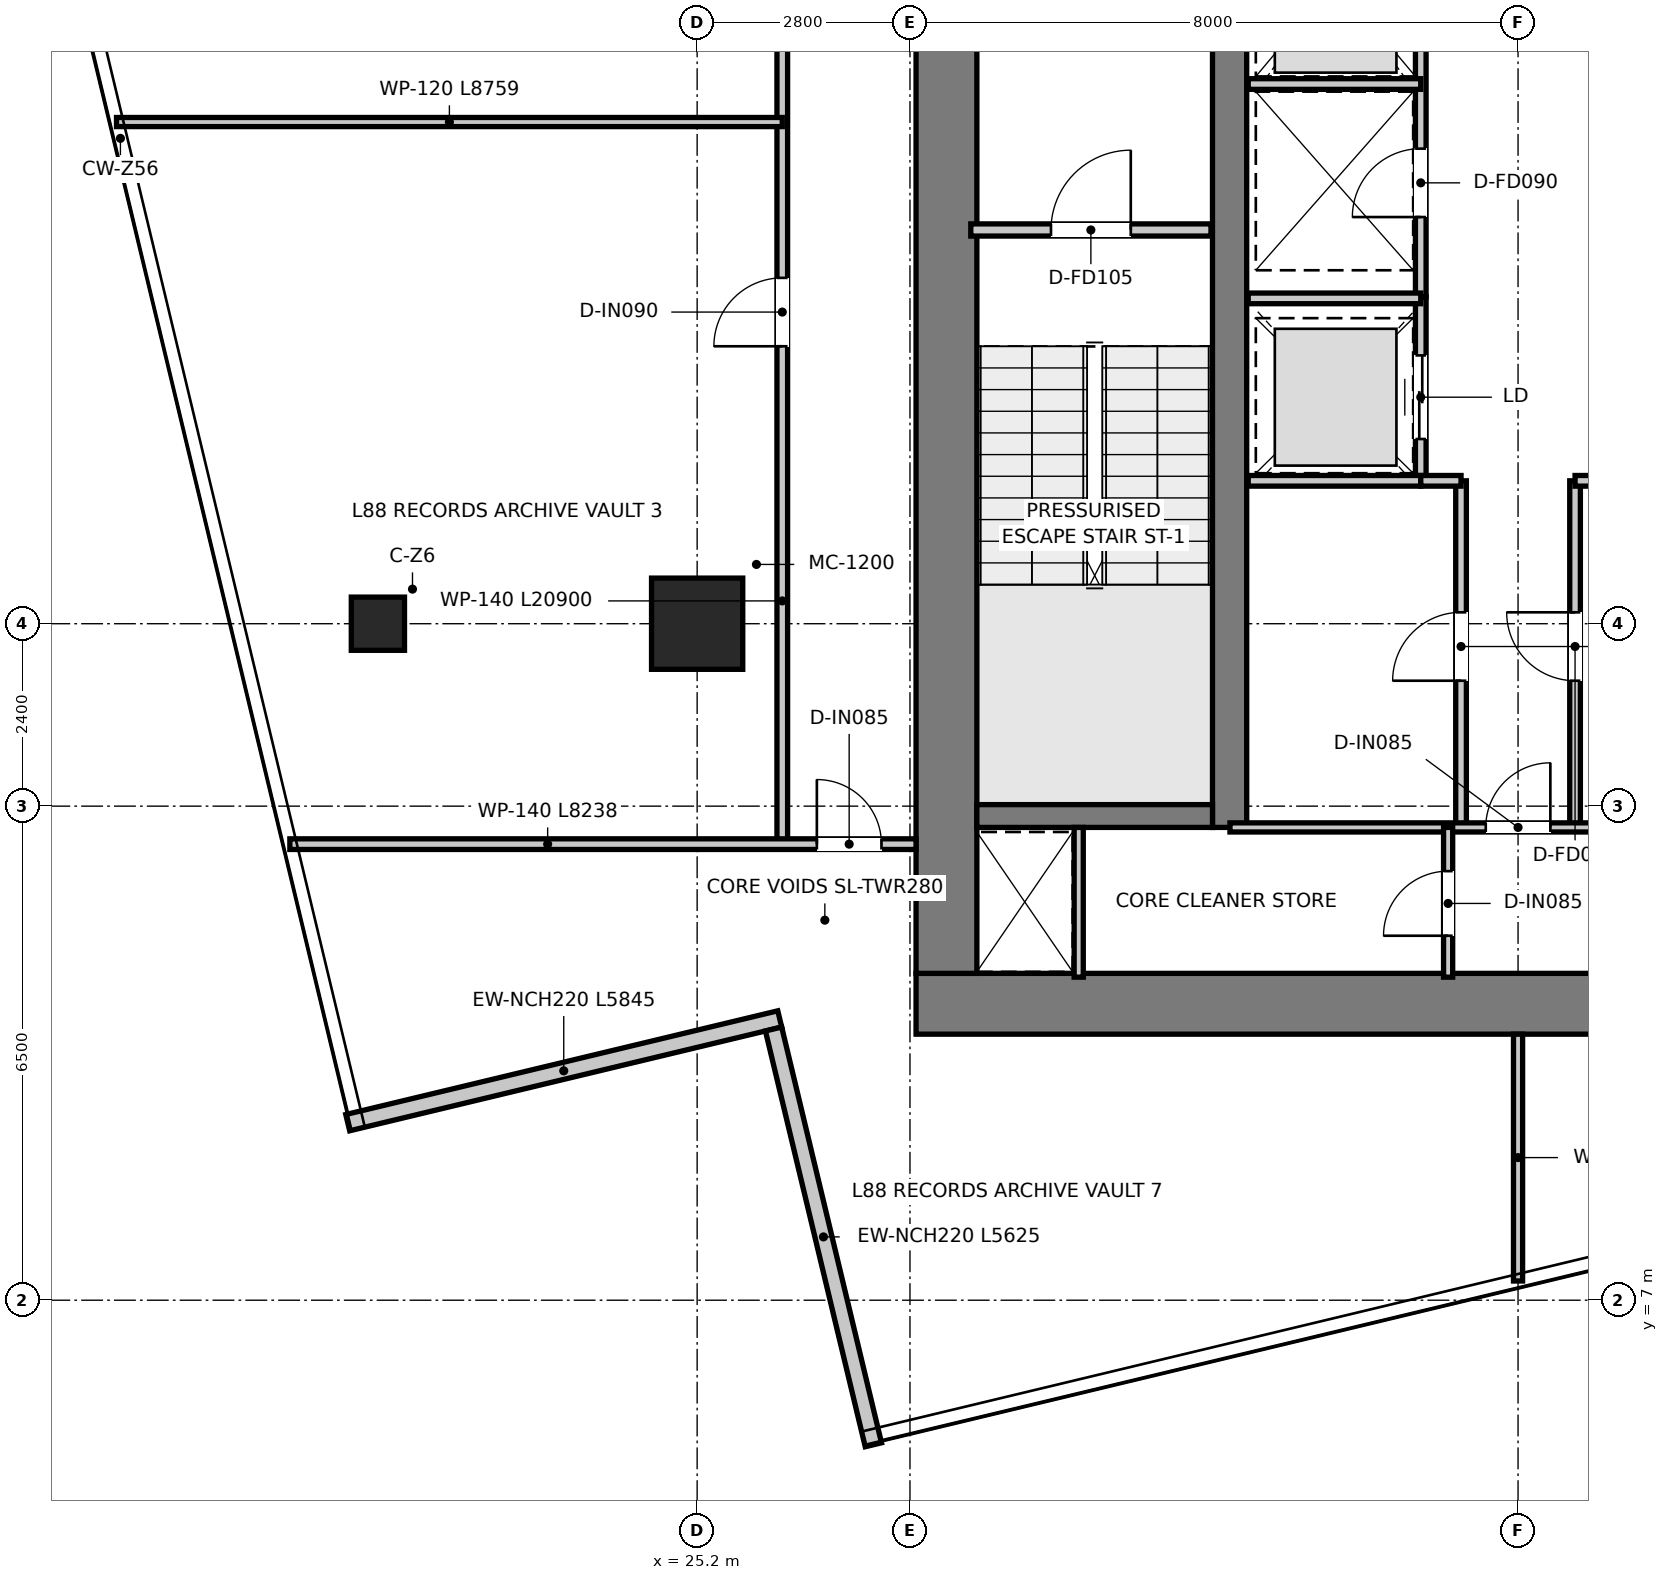
"""IFC4 building model, lengths in metres.
Left out: names, types, materials, properties, quantities, classifications, styles, units other than length and angle.
Written with IfcOpenShell. Run it as: python <this file> out.ifc"""

import sys

from ifc_helpers import new_model, si_unit, direction, frame, frame_2d, origin, origin_2d, place, context, subcontext, project, spatial, rectangle, extrude, source, transform, mapped, element, fill, save


model = new_model("IFC4")
c1 = context("Model", 3, precision=1e-05, world=origin(), true_north=direction((0.0, 1.0)))
c2 = subcontext(c1, "Body", "Model", "MODEL_VIEW")
j1 = project(units=[si_unit("LENGTHUNIT", "METRE"), si_unit("PLANEANGLEUNIT", "RADIAN")], contexts=[c1])
p1 = place(None, origin())
s1 = spatial("IfcSite", under=j1, at=p1, CompositionType="ELEMENT")
p2 = place(p1, origin())
s2 = spatial("IfcBuilding", under=s1, at=p2, CompositionType="ELEMENT")
p3 = place(p2, frame((0.0, 0.0, 359.3)))
s3 = spatial("IfcBuildingStorey", under=s2, at=p3, CompositionType="ELEMENT", Elevation=359.3)
p4 = place(p3, frame((28.08, 10.9, 0.0), z_axis=(0.0, 0.0, 1.0), x_axis=(1.0, 0.0, 0.0)))
e1 = element("IfcWall", 1, at=p4, inside=s3, PredefinedType="SHEAR", context=c2, shape_type="SweptSolid", body=[
    extrude(rectangle(XDim=15.84, YDim=0.8, at=frame_2d((7.92, 0.0))), origin(), (0.0, 0.0, 1.0), 3.95),
])
p5 = place(p3, frame((28.48, 11.3, 0.0), z_axis=(0.0, 0.0, 1.0), x_axis=(0.0, 1.0, 0.0)))
e2 = element("IfcWall", 2, at=p5, inside=s3, PredefinedType="SHEAR", context=c2, shape_type="SweptSolid", body=[
    extrude(rectangle(XDim=14.7, YDim=0.8, at=frame_2d((7.35, 0.0))), origin(), (0.0, 0.0, 1.0), 3.95),
])
p6 = place(p3, frame((32.205, 13.22, 0.0), z_axis=(0.0, 0.0, 1.0), x_axis=(0.0, 1.0, 0.0)))
e3 = element("IfcWall", 3, at=p6, inside=s3, PredefinedType="SHEAR", context=c2, shape_type="SweptSolid", body=[
    extrude(rectangle(XDim=12.78, YDim=0.45, at=frame_2d((6.39, 0.0))), origin(), (0.0, 0.0, 1.0), 3.95),
])
p7 = place(p6, frame((10.58, 0.0, 0.0)))
e4 = element("IfcOpeningElement", 4, at=p7, cuts=e3, PredefinedType="OPENING", context=c2, shape_type="SweptSolid", body=[
    extrude(rectangle(XDim=1.1, YDim=2.15, at=frame_2d((0.55, 1.075))), frame((0.0, 0.235, 0.0), z_axis=(0.0, -1.0, 0.0), x_axis=(1.0, 0.0, 0.0)), (0.0, 0.0, 1.0), 0.47),
])
p8 = place(p3, frame((28.88, 13.37, 0.0), z_axis=(0.0, 0.0, 1.0), x_axis=(1.0, 0.0, 0.0)))
e5 = element("IfcWall", 5, at=p8, inside=s3, PredefinedType="SHEAR", context=c2, shape_type="SweptSolid", body=[
    extrude(rectangle(XDim=3.1, YDim=0.3, at=frame_2d((1.55, 0.0))), origin(), (0.0, 0.0, 1.0), 3.95),
])
m1 = source(origin(), c2, "Body", "SweptSolid", [
    extrude(rectangle(XDim=1.2, YDim=1.2, at=origin_2d()), origin(), (0.0, 0.0, 1.0), 3.95),
])
p9 = place(p3, frame((25.2, 15.9, 0.0), z_axis=(0.0, 0.0, 1.0), x_axis=(1.0, 0.0, 0.0)))
e6 = element("IfcColumn", 6, at=p9, inside=s3, PredefinedType="USERDEFINED", context=c2, shape_type="MappedRepresentation", body=[
    mapped(m1, transform((0.0, 0.0, 0.0), x_axis=(1.0, 0.0, 0.0), y_axis=(0.0, 1.0, 0.0), z_axis=(0.0, 0.0, 1.0), scale=1.0)),
])
m2 = source(origin(), c2, "Body", "SweptSolid", [
    extrude(rectangle(XDim=0.7, YDim=0.7, at=origin_2d()), origin(), (0.0, 0.0, 1.0), 3.95),
])
p10 = place(p3, frame((21.0, 15.9, 0.0), z_axis=(0.0, 0.0, 1.0), x_axis=(1.0, 0.0, 0.0)))
e7 = element("IfcColumn", 7, at=p10, inside=s3, PredefinedType="COLUMN", context=c2, shape_type="MappedRepresentation", body=[
    mapped(m2, transform((0.0, 0.0, 0.0), x_axis=(1.0, 0.0, 0.0), y_axis=(0.0, 1.0, 0.0), z_axis=(0.0, 0.0, 1.0), scale=1.0)),
])
p11 = place(p3, frame((20.603, 9.336, 0.0), z_axis=(0.0, 0.0, 1.0), x_axis=(0.972367961768, 0.233453521986, 0.0)))
e8 = element("IfcWall", 8, at=p11, inside=s3, PredefinedType="ELEMENTEDWALL", context=c2, shape_type="SweptSolid", body=[
    extrude(rectangle(XDim=5.845, YDim=0.22, at=frame_2d((2.922, 0.0))), origin(), (0.0, 0.0, 1.0), 3.6),
])
p12 = place(p3, frame((26.205, 10.568, 0.0), z_axis=(0.0, 0.0, 1.0), x_axis=(0.233456668573, -0.972367206306, 0.0)))
e9 = element("IfcWall", 9, at=p12, inside=s3, PredefinedType="ELEMENTEDWALL", context=c2, shape_type="SweptSolid", body=[
    extrude(rectangle(XDim=5.625, YDim=0.22, at=frame_2d((2.812, 0.0))), origin(), (0.0, 0.0, 1.0), 3.6),
])
p13 = place(p3, frame((28.8, 21.08, 0.0), z_axis=(0.0, 0.0, 1.0), x_axis=(1.0, 0.0, 0.0)))
e10 = element("IfcWall", 10, at=p13, inside=s3, PredefinedType="PARTITIONING", context=c2, shape_type="SweptSolid", body=[
    extrude(rectangle(XDim=3.16, YDim=0.16, at=frame_2d((1.58, 0.0))), origin(), (0.0, 0.0, 1.0), 3.6),
])
p14 = place(p13, frame((1.055, 0.0, 0.0)))
e11 = element("IfcOpeningElement", 11, at=p14, cuts=e10, PredefinedType="OPENING", context=c2, shape_type="SweptSolid", body=[
    extrude(rectangle(XDim=1.05, YDim=2.1, at=frame_2d((0.525, 1.05))), frame((0.0, 0.09, 0.0), z_axis=(0.0, -1.0, 0.0), x_axis=(1.0, 0.0, 0.0)), (0.0, 0.0, 1.0), 0.18),
])
p15 = place(p3, frame((34.72, 20.2, 0.0), z_axis=(0.0, 0.0, 1.0), x_axis=(0.0, 1.0, 0.0)))
e12 = element("IfcWall", 12, at=p15, inside=s3, PredefinedType="PARTITIONING", context=c2, shape_type="SweptSolid", body=[
    extrude(rectangle(XDim=5.78, YDim=0.14, at=frame_2d((2.89, 0.0))), origin(), (0.0, 0.0, 1.0), 2.75),
])
p16 = place(p15, frame((1.05, 0.0, 0.0)))
e13 = element("IfcOpeningElement", 13, at=p16, cuts=e12, PredefinedType="OPENING", context=c2, shape_type="SweptSolid", body=[
    extrude(rectangle(XDim=0.9, YDim=2.1, at=frame_2d((0.45, 1.05))), frame((0.0, 0.08, 0.0), z_axis=(0.0, -1.0, 0.0), x_axis=(1.0, 0.0, 0.0)), (0.0, 0.0, 1.0), 0.16),
])
p17 = place(p3, frame((32.45, 23.0, 0.0), z_axis=(0.0, 0.0, 1.0), x_axis=(1.0, 0.0, 0.0)))
e14 = element("IfcWall", 14, at=p17, inside=s3, PredefinedType="PARTITIONING", context=c2, shape_type="SweptSolid", body=[
    extrude(rectangle(XDim=2.27, YDim=0.14, at=frame_2d((1.135, 0.0))), origin(), (0.0, 0.0, 1.0), 2.75),
])
p18 = place(p3, frame((34.72, 17.78, 0.0), z_axis=(0.0, 0.0, 1.0), x_axis=(0.0, 1.0, 0.0)))
e15 = element("IfcWall", 15, at=p18, inside=s3, PredefinedType="PARTITIONING", context=c2, shape_type="SweptSolid", body=[
    extrude(rectangle(XDim=2.42, YDim=0.14, at=frame_2d((1.21, 0.0))), origin(), (0.0, 0.0, 1.0), 3.6),
])
p19 = place(p18, frame((0.55, 0.0, 0.0)))
e16 = element("IfcOpeningElement", 16, at=p19, cuts=e15, PredefinedType="OPENING", context=c2, shape_type="SweptSolid", body=[
    extrude(rectangle(XDim=1.1, YDim=2.15, at=frame_2d((0.55, 1.075))), frame((0.0, 0.08, 0.0), z_axis=(0.0, -1.0, 0.0), x_axis=(1.0, 0.0, 0.0)), (0.0, 0.0, 1.0), 0.16),
])
for number, where, z_axis, x_axis in (
    (17, (32.45, 17.78, 0.0), (0.0, 0.0, 1.0), (1.0, 0.0, 0.0)),
    (18, (32.45, 20.18, 0.0), (0.0, 0.0, 1.0), (1.0, 0.0, 0.0)),
):
    element("IfcWall", number, at=place(p3, frame(where, z_axis=z_axis, x_axis=x_axis)), inside=s3, PredefinedType="PARTITIONING", context=c2, shape_type="SweptSolid", body=[
        extrude(rectangle(XDim=2.27, YDim=0.14, at=frame_2d((1.135, 0.0))), origin(), (0.0, 0.0, 1.0), 3.6),
    ])
p20 = place(p3, frame((35.25, 13.22, 0.0), z_axis=(0.0, 0.0, 1.0), x_axis=(0.0, 1.0, 0.0)))
e19 = element("IfcWall", 19, at=p20, inside=s3, PredefinedType="PARTITIONING", context=c2, shape_type="SweptSolid", body=[
    extrude(rectangle(XDim=4.56, YDim=0.14, at=frame_2d((2.28, 0.0))), origin(), (0.0, 0.0, 1.0), 3.6),
])
p21 = place(p20, frame((1.93, 0.0, 0.0)))
e20 = element("IfcOpeningElement", 20, at=p21, cuts=e19, PredefinedType="OPENING", context=c2, shape_type="SweptSolid", body=[
    extrude(rectangle(XDim=0.9, YDim=2.1, at=frame_2d((0.45, 1.05))), frame((0.0, 0.08, 0.0), z_axis=(0.0, -1.0, 0.0), x_axis=(1.0, 0.0, 0.0)), (0.0, 0.0, 1.0), 0.16),
])
p22 = place(p3, frame((34.72, 17.78, 0.0), z_axis=(0.0, 0.0, 1.0), x_axis=(1.0, 0.0, 0.0)))
e21 = element("IfcWall", 21, at=p22, inside=s3, PredefinedType="PARTITIONING", context=c2, shape_type="SweptSolid", body=[
    extrude(rectangle(XDim=0.53, YDim=0.14, at=frame_2d((0.265, 0.0))), origin(), (0.0, 0.0, 1.0), 3.6),
])
p23 = place(p3, frame((36.75, 13.22, 0.0), z_axis=(0.0, 0.0, 1.0), x_axis=(0.0, 1.0, 0.0)))
e22 = element("IfcWall", 22, at=p23, inside=s3, PredefinedType="PARTITIONING", context=c2, shape_type="SweptSolid", body=[
    extrude(rectangle(XDim=4.56, YDim=0.14, at=frame_2d((2.28, 0.0))), origin(), (0.0, 0.0, 1.0), 3.6),
])
p24 = place(p23, frame((1.93, 0.0, 0.0)))
e23 = element("IfcOpeningElement", 23, at=p24, cuts=e22, PredefinedType="OPENING", context=c2, shape_type="SweptSolid", body=[
    extrude(rectangle(XDim=0.9, YDim=2.1, at=frame_2d((0.45, 1.05))), frame((0.0, 0.08, 0.0), z_axis=(0.0, -1.0, 0.0), x_axis=(1.0, 0.0, 0.0)), (0.0, 0.0, 1.0), 0.16),
])
p25 = place(p3, frame((36.75, 17.78, 0.0), z_axis=(0.0, 0.0, 1.0), x_axis=(1.0, 0.0, 0.0)))
e24 = element("IfcWall", 24, at=p25, inside=s3, PredefinedType="PARTITIONING", context=c2, shape_type="SweptSolid", body=[
    extrude(rectangle(XDim=0.53, YDim=0.14, at=frame_2d((0.265, 0.0))), origin(), (0.0, 0.0, 1.0), 3.6),
])
p26 = place(p3, frame((30.22, 11.25, 0.0), z_axis=(0.0, 0.0, 1.0), x_axis=(0.0, 1.0, 0.0)))
e25 = element("IfcWall", 25, at=p26, inside=s3, PredefinedType="PARTITIONING", context=c2, shape_type="SweptSolid", body=[
    extrude(rectangle(XDim=1.97, YDim=0.12, at=frame_2d((0.985, 0.0))), origin(), (0.0, 0.0, 1.0), 3.6),
])
p27 = place(p3, frame((32.21, 13.22, 0.0), z_axis=(0.0, 0.0, 1.0), x_axis=(1.0, 0.0, 0.0)))
e26 = element("IfcWall", 26, at=p27, inside=s3, PredefinedType="PARTITIONING", context=c2, shape_type="SweptSolid", body=[
    extrude(rectangle(XDim=7.58, YDim=0.12, at=frame_2d((3.79, 0.0))), origin(), (0.0, 0.0, 1.0), 3.6),
])
p28 = place(p27, frame((3.365, 0.0, 0.0)))
e27 = element("IfcOpeningElement", 27, at=p28, cuts=e26, PredefinedType="OPENING", context=c2, shape_type="SweptSolid", body=[
    extrude(rectangle(XDim=0.85, YDim=2.1, at=frame_2d((0.425, 1.05))), frame((0.0, 0.07, 0.0), z_axis=(0.0, -1.0, 0.0), x_axis=(1.0, 0.0, 0.0)), (0.0, 0.0, 1.0), 0.14),
])
p29 = place(p3, frame((35.08, 11.25, 0.0), z_axis=(0.0, 0.0, 1.0), x_axis=(0.0, 1.0, 0.0)))
e28 = element("IfcWall", 28, at=p29, inside=s3, PredefinedType="PARTITIONING", context=c2, shape_type="SweptSolid", body=[
    extrude(rectangle(XDim=1.97, YDim=0.12, at=frame_2d((0.985, 0.0))), origin(), (0.0, 0.0, 1.0), 3.6),
])
p30 = place(p29, frame((0.545, 0.0, 0.0)))
e29 = element("IfcOpeningElement", 29, at=p30, cuts=e28, PredefinedType="OPENING", context=c2, shape_type="SweptSolid", body=[
    extrude(rectangle(XDim=0.85, YDim=2.1, at=frame_2d((0.425, 1.05))), frame((0.0, 0.07, 0.0), z_axis=(0.0, -1.0, 0.0), x_axis=(1.0, 0.0, 0.0)), (0.0, 0.0, 1.0), 0.14),
])
p31 = place(p3, frame((26.32, 13.0, 0.0), z_axis=(0.0, 0.0, 1.0), x_axis=(0.0, 1.0, 0.0)))
e30 = element("IfcWall", 30, at=p31, inside=s3, PredefinedType="PARTITIONING", context=c2, shape_type="SweptSolid", body=[
    extrude(rectangle(XDim=15.66, YDim=0.14, at=frame_2d((7.83, 0.0))), origin(), (0.0, 0.0, 1.0), 3.06),
])
p32 = place(p31, frame((14.3, 0.0, 0.0)))
e31 = element("IfcOpeningElement", 31, at=p32, cuts=e30, PredefinedType="OPENING", context=c2, shape_type="SweptSolid", body=[
    extrude(rectangle(XDim=0.9, YDim=2.1, at=frame_2d((0.45, 1.05))), frame((0.0, 0.08, 0.0), z_axis=(0.0, -1.0, 0.0), x_axis=(1.0, 0.0, 0.0)), (0.0, 0.0, 1.0), 0.16),
])
p33 = place(p31, frame((6.55, 0.0, 0.0)))
e32 = element("IfcOpeningElement", 32, at=p33, cuts=e30, PredefinedType="OPENING", context=c2, shape_type="SweptSolid", body=[
    extrude(rectangle(XDim=0.9, YDim=2.1, at=frame_2d((0.45, 1.05))), frame((0.0, 0.08, 0.0), z_axis=(0.0, -1.0, 0.0), x_axis=(1.0, 0.0, 0.0)), (0.0, 0.0, 1.0), 0.16),
])
p34 = place(p31, frame((11.21, 0.0, 0.0)))
e33 = element("IfcOpeningElement", 33, at=p34, cuts=e30, PredefinedType="OPENING", context=c2, shape_type="SweptSolid", body=[
    extrude(rectangle(XDim=0.9, YDim=2.1, at=frame_2d((0.45, 1.05))), frame((0.0, 0.08, 0.0), z_axis=(0.0, -1.0, 0.0), x_axis=(1.0, 0.0, 0.0)), (0.0, 0.0, 1.0), 0.16),
])
p35 = place(p3, frame((19.842, 13.0, 0.0), z_axis=(0.0, 0.0, 1.0), x_axis=(1.0, 0.0, 0.0)))
e34 = element("IfcWall", 34, at=p35, inside=s3, PredefinedType="PARTITIONING", context=c2, shape_type="SweptSolid", body=[
    extrude(rectangle(XDim=8.238, YDim=0.14, at=frame_2d((4.119, 0.0))), origin(), (0.0, 0.0, 1.0), 3.11),
])
p36 = place(p35, frame((6.933, 0.0, 0.0)))
e35 = element("IfcOpeningElement", 35, at=p36, cuts=e34, PredefinedType="OPENING", context=c2, shape_type="SweptSolid", body=[
    extrude(rectangle(XDim=0.85, YDim=2.1, at=frame_2d((0.425, 1.05))), frame((0.0, 0.08, 0.0), z_axis=(0.0, -1.0, 0.0), x_axis=(1.0, 0.0, 0.0)), (0.0, 0.0, 1.0), 0.16),
])
p37 = place(p3, frame((17.561, 22.5, 0.0), z_axis=(0.0, 0.0, 1.0), x_axis=(1.0, 0.0, 0.0)))
e36 = element("IfcWall", 36, at=p37, inside=s3, PredefinedType="PARTITIONING", context=c2, shape_type="SweptSolid", body=[
    extrude(rectangle(XDim=8.759, YDim=0.12, at=frame_2d((4.379, 0.0))), origin(), (0.0, 0.0, 1.0), 3.06),
])
p38 = place(p3, frame((36.0, 7.253, 0.0), z_axis=(0.0, 0.0, 1.0), x_axis=(0.0, 1.0, 0.0)))
e37 = element("IfcWall", 37, at=p38, inside=s3, PredefinedType="PARTITIONING", context=c2, shape_type="SweptSolid", body=[
    extrude(rectangle(XDim=3.247, YDim=0.12, at=frame_2d((1.624, 0.0))), origin(), (0.0, 0.0, 1.0), 3.6),
])
p39 = place(p14, origin())
e38 = element("IfcDoor", 38, at=p39, inside=s3, OperationType="SINGLE_SWING_RIGHT", PredefinedType="DOOR", context=c2, shape_type="SweptSolid", body=[
    extrude(rectangle(XDim=1.05, YDim=2.1, at=frame_2d((0.525, 1.05))), frame((0.0, 0.025, 0.0), z_axis=(0.0, -1.0, 0.0), x_axis=(1.0, 0.0, 0.0)), (0.0, 0.0, 1.0), 0.05),
])
fill(e11, e38)
p40 = place(p16, origin())
e39 = element("IfcDoor", 39, at=p40, inside=s3, OperationType="SINGLE_SWING_LEFT", PredefinedType="DOOR", context=c2, shape_type="SweptSolid", body=[
    extrude(rectangle(XDim=0.9, YDim=2.1, at=frame_2d((0.45, 1.05))), frame((0.0, 0.025, 0.0), z_axis=(0.0, -1.0, 0.0), x_axis=(1.0, 0.0, 0.0)), (0.0, 0.0, 1.0), 0.05),
])
fill(e13, e39)
p41 = place(p19, origin())
e40 = element("IfcDoor", 40, at=p41, inside=s3, OperationType="DOUBLE_DOOR_SLIDING", PredefinedType="DOOR", context=c2, shape_type="SweptSolid", body=[
    extrude(rectangle(XDim=1.1, YDim=2.15, at=frame_2d((0.55, 1.075))), frame((0.0, 0.025, 0.0), z_axis=(0.0, -1.0, 0.0), x_axis=(1.0, 0.0, 0.0)), (0.0, 0.0, 1.0), 0.05),
])
fill(e16, e40)
p42 = place(p21, origin())
e41 = element("IfcDoor", 41, at=p42, inside=s3, OperationType="SINGLE_SWING_LEFT", PredefinedType="DOOR", context=c2, shape_type="SweptSolid", body=[
    extrude(rectangle(XDim=0.9, YDim=2.1, at=frame_2d((0.45, 1.05))), frame((0.0, 0.025, 0.0), z_axis=(0.0, -1.0, 0.0), x_axis=(1.0, 0.0, 0.0)), (0.0, 0.0, 1.0), 0.05),
])
fill(e20, e41)
p43 = place(p24, origin())
e42 = element("IfcDoor", 42, at=p43, inside=s3, OperationType="SINGLE_SWING_RIGHT", PredefinedType="DOOR", context=c2, shape_type="SweptSolid", body=[
    extrude(rectangle(XDim=0.9, YDim=2.1, at=frame_2d((0.45, 1.05))), frame((0.0, 0.025, 0.0), z_axis=(0.0, -1.0, 0.0), x_axis=(1.0, 0.0, 0.0)), (0.0, 0.0, 1.0), 0.05),
])
fill(e23, e42)
p44 = place(p28, origin())
e43 = element("IfcDoor", 43, at=p44, inside=s3, OperationType="SINGLE_SWING_RIGHT", PredefinedType="DOOR", context=c2, shape_type="SweptSolid", body=[
    extrude(rectangle(XDim=0.85, YDim=2.1, at=frame_2d((0.425, 1.05))), frame((0.0, 0.025, 0.0), z_axis=(0.0, -1.0, 0.0), x_axis=(1.0, 0.0, 0.0)), (0.0, 0.0, 1.0), 0.05),
])
fill(e27, e43)
p45 = place(p30, origin())
e44 = element("IfcDoor", 44, at=p45, inside=s3, OperationType="SINGLE_SWING_LEFT", PredefinedType="DOOR", context=c2, shape_type="SweptSolid", body=[
    extrude(rectangle(XDim=0.85, YDim=2.1, at=frame_2d((0.425, 1.05))), frame((0.0, 0.025, 0.0), z_axis=(0.0, -1.0, 0.0), x_axis=(1.0, 0.0, 0.0)), (0.0, 0.0, 1.0), 0.05),
])
fill(e29, e44)
p46 = place(p33, origin())
e45 = element("IfcDoor", 45, at=p46, inside=s3, OperationType="SINGLE_SWING_LEFT", PredefinedType="DOOR", context=c2, shape_type="SweptSolid", body=[
    extrude(rectangle(XDim=0.9, YDim=2.1, at=frame_2d((0.45, 1.05))), frame((0.0, 0.025, 0.0), z_axis=(0.0, -1.0, 0.0), x_axis=(1.0, 0.0, 0.0)), (0.0, 0.0, 1.0), 0.05),
])
fill(e32, e45)
p47 = place(p36, origin())
e46 = element("IfcDoor", 46, at=p47, inside=s3, OperationType="SINGLE_SWING_LEFT", PredefinedType="DOOR", context=c2, shape_type="SweptSolid", body=[
    extrude(rectangle(XDim=0.85, YDim=2.1, at=frame_2d((0.425, 1.05))), frame((0.0, 0.025, 0.0), z_axis=(0.0, -1.0, 0.0), x_axis=(1.0, 0.0, 0.0)), (0.0, 0.0, 1.0), 0.05),
])
fill(e35, e46)
save(model, sys.argv[1])
